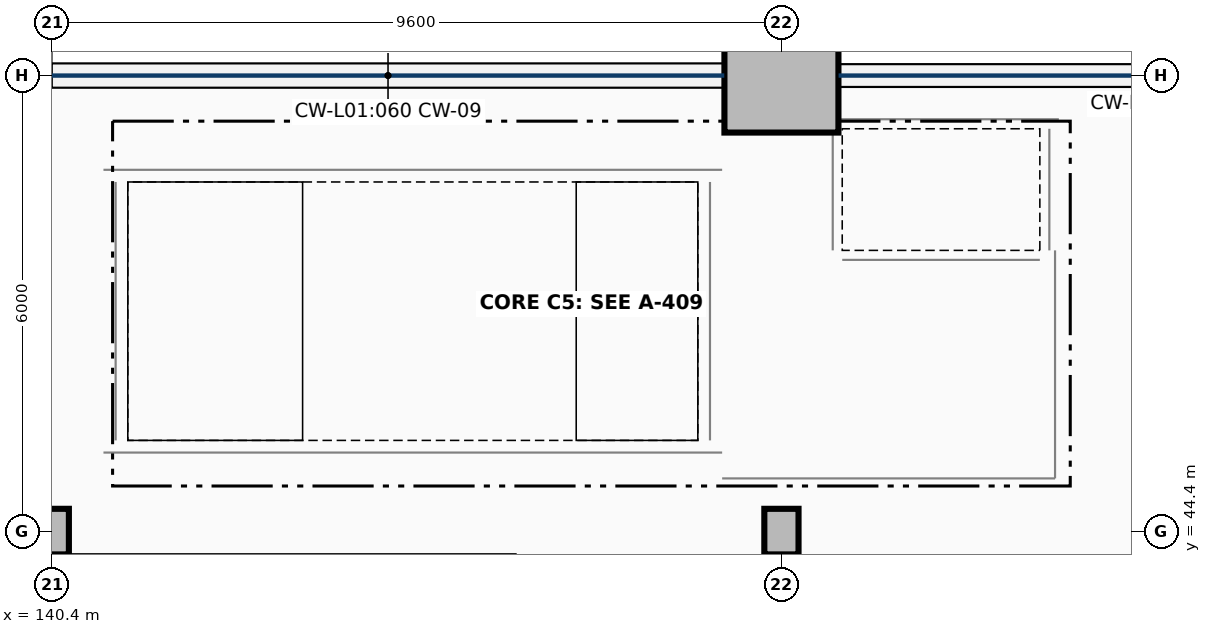
"""IFC4 building model, lengths in metres.
Left out: names, types, materials, properties, quantities, classifications, styles, units other than length and angle.
Written with IfcOpenShell. Run it as: python <this file> out.ifc"""

import sys

from ifc_helpers import new_model, si_unit, direction, frame, frame_2d, origin, origin_2d, place, context, subcontext, project, spatial, rectangle, extrude, element, fill, save


model = new_model("IFC4")
c1 = context("Model", 3, precision=1e-05, world=origin(), true_north=direction((0.0, 1.0)))
c2 = subcontext(c1, "Body", "Model", "MODEL_VIEW")
j1 = project(units=[si_unit("LENGTHUNIT", "METRE"), si_unit("PLANEANGLEUNIT", "RADIAN")], contexts=[c1])
p1 = place(None, origin())
s1 = spatial("IfcSite", under=j1, at=p1, CompositionType="ELEMENT")
p2 = place(p1, origin())
s2 = spatial("IfcBuilding", under=s1, at=p2, CompositionType="ELEMENT")
p3 = place(p2, frame((0.0, 0.0, 5.1)))
s3 = spatial("IfcBuildingStorey", under=s2, at=p3, CompositionType="ELEMENT", Elevation=5.1)
for number, where, z_axis, x_axis in (
    (1, (140.4, 44.4, 0.0), (0.0, 0.0, 1.0), (1.0, 0.0, 0.0)),
    (2, (150.0, 44.4, 0.0), (0.0, 0.0, 1.0), (1.0, 0.0, 0.0)),
):
    element("IfcColumn", number, at=place(p3, frame(where, z_axis=z_axis, x_axis=x_axis)), inside=s3, PredefinedType="COLUMN", context=c2, shape_type="SweptSolid", body=[
        extrude(rectangle(XDim=0.45, YDim=0.6, at=origin_2d()), origin(), (0.0, 0.0, 1.0), 4.42),
    ])
p4 = place(p3, frame((150.0, 50.4, 0.0), z_axis=(0.0, 0.0, 1.0), x_axis=(1.0, 0.0, 0.0)))
e3 = element("IfcColumn", 3, at=p4, inside=s3, PredefinedType="COLUMN", context=c2, shape_type="SweptSolid", body=[
    extrude(rectangle(XDim=1.5, YDim=1.5, at=origin_2d()), origin(), (0.0, 0.0, 1.0), 4.42),
])
p5 = place(p3, frame((131.027, 50.4, 0.0), z_axis=(0.0, 0.0, 1.0), x_axis=(1.0, 0.0, 0.0)))
e4 = element("IfcWall", 4, at=p5, inside=s3, PredefinedType="SOLIDWALL", context=c2, shape_type="SweptSolid", body=[
    extrude(rectangle(XDim=9.373, YDim=0.3, at=frame_2d((4.687, 0.0))), origin(), (0.0, 0.0, 1.0), 0.85),
])
p6 = place(p3, frame((140.4, 50.4, 0.0), z_axis=(0.0, 0.0, 1.0), x_axis=(1.0, 0.0, 0.0)))
e5 = element("IfcWall", 5, at=p6, inside=s3, PredefinedType="SOLIDWALL", context=c2, shape_type="SweptSolid", body=[
    extrude(rectangle(XDim=8.848, YDim=0.32, at=frame_2d((4.424, 0.0))), origin(), (0.0, 0.0, 1.0), 0.85),
])
p7 = place(p3, frame((150.752, 50.4, 0.0), z_axis=(0.0, 0.0, 1.0), x_axis=(1.0, 0.0, 0.0)))
e6 = element("IfcWall", 6, at=p7, inside=s3, PredefinedType="SOLIDWALL", context=c2, shape_type="SweptSolid", body=[
    extrude(rectangle(XDim=8.096, YDim=0.3, at=frame_2d((4.048, 0.0))), origin(), (0.0, 0.0, 1.0), 0.85),
])
p8 = place(p3, frame((141.24, 45.6, 0.0), z_axis=(0.0, 0.0, 1.0), x_axis=(0.0, 1.0, 0.0)))
e7 = element("IfcWall", 7, at=p8, inside=s3, PredefinedType="SHEAR", context=c2, shape_type="SweptSolid", body=[
    extrude(rectangle(XDim=3.4, YDim=0.32, at=frame_2d((1.7, 0.0))), origin(), (0.0, 0.0, 1.0), 4.42),
])
for number, where, z_axis, x_axis in (
    (8, (141.08, 45.44, 0.0), (0.0, 0.0, 1.0), (1.0, 0.0, 0.0)),
    (9, (141.08, 49.16, 0.0), (0.0, 0.0, 1.0), (1.0, 0.0, 0.0)),
):
    element("IfcWall", number, at=place(p3, frame(where, z_axis=z_axis, x_axis=x_axis)), inside=s3, PredefinedType="SHEAR", context=c2, shape_type="SweptSolid", body=[
        extrude(rectangle(XDim=8.14, YDim=0.32, at=frame_2d((4.07, 0.0))), origin(), (0.0, 0.0, 1.0), 4.42),
    ])
p9 = place(p3, frame((149.06, 45.6, 0.0), z_axis=(0.0, 0.0, 1.0), x_axis=(0.0, 1.0, 0.0)))
e10 = element("IfcWall", 10, at=p9, inside=s3, PredefinedType="SHEAR", context=c2, shape_type="SweptSolid", body=[
    extrude(rectangle(XDim=3.4, YDim=0.32, at=frame_2d((1.7, 0.0))), origin(), (0.0, 0.0, 1.0), 4.42),
])
p10 = place(p9, frame((0.65, 0.0, 0.0)))
e11 = element("IfcOpeningElement", 11, at=p10, cuts=e10, PredefinedType="OPENING", context=c2, shape_type="SweptSolid", body=[
    extrude(rectangle(XDim=1.2, YDim=2.2, at=frame_2d((0.6, 1.1))), frame((0.0, 0.17, 0.0), z_axis=(0.0, -1.0, 0.0), x_axis=(1.0, 0.0, 0.0)), (0.0, 0.0, 1.0), 0.34),
])
for number, where, z_axis, x_axis in (
    (12, (150.675, 48.1, 0.0), (0.0, 0.0, 1.0), (0.0, 1.0, 0.0)),
    (13, (153.525, 48.1, 0.0), (0.0, 0.0, 1.0), (0.0, 1.0, 0.0)),
):
    element("IfcWall", number, at=place(p3, frame(where, z_axis=z_axis, x_axis=x_axis)), inside=s3, PredefinedType="SHEAR", context=c2, shape_type="SweptSolid", body=[
        extrude(rectangle(XDim=1.6, YDim=0.25, at=frame_2d((0.8, 0.0))), origin(), (0.0, 0.0, 1.0), 4.42),
    ])
p11 = place(p3, frame((150.55, 49.825, 0.0), z_axis=(0.0, 0.0, 1.0), x_axis=(1.0, 0.0, 0.0)))
e14 = element("IfcWall", 14, at=p11, inside=s3, PredefinedType="SHEAR", context=c2, shape_type="SweptSolid", body=[
    extrude(rectangle(XDim=3.1, YDim=0.25, at=frame_2d((1.55, 0.0))), origin(), (0.0, 0.0, 1.0), 4.42),
])
p12 = place(p3, frame((150.8, 47.975, 0.0), z_axis=(0.0, 0.0, 1.0), x_axis=(1.0, 0.0, 0.0)))
e15 = element("IfcWall", 15, at=p12, inside=s3, PredefinedType="SHEAR", context=c2, shape_type="SweptSolid", body=[
    extrude(rectangle(XDim=2.6, YDim=0.25, at=frame_2d((1.3, 0.0))), origin(), (0.0, 0.0, 1.0), 4.42),
])
p13 = place(p12, frame((0.75, 0.0, 0.0)))
e16 = element("IfcOpeningElement", 16, at=p13, cuts=e15, PredefinedType="OPENING", context=c2, shape_type="SweptSolid", body=[
    extrude(rectangle(XDim=1.1, YDim=2.15, at=frame_2d((0.55, 1.075))), frame((0.0, 0.135, 0.0), z_axis=(0.0, -1.0, 0.0), x_axis=(1.0, 0.0, 0.0)), (0.0, 0.0, 1.0), 0.27),
])
p14 = place(p3, frame((153.6, 45.1, 0.0), z_axis=(0.0, 0.0, 1.0), x_axis=(0.0, 1.0, 0.0)))
e17 = element("IfcWall", 17, at=p14, inside=s3, PredefinedType="PARTITIONING", context=c2, shape_type="SweptSolid", body=[
    extrude(rectangle(XDim=3.0, YDim=0.2, at=frame_2d((1.5, 0.0))), origin(), (0.0, 0.0, 1.0), 3.184),
])
p15 = place(p14, frame((0.775, 0.0, 0.0)))
e18 = element("IfcOpeningElement", 18, at=p15, cuts=e17, PredefinedType="OPENING", context=c2, shape_type="SweptSolid", body=[
    extrude(rectangle(XDim=1.45, YDim=2.2, at=frame_2d((0.725, 1.1))), frame((0.0, 0.11, 0.0), z_axis=(0.0, -1.0, 0.0), x_axis=(1.0, 0.0, 0.0)), (0.0, 0.0, 1.0), 0.22),
])
p16 = place(p3, frame((149.22, 45.1, 0.0), z_axis=(0.0, 0.0, 1.0), x_axis=(1.0, 0.0, 0.0)))
e19 = element("IfcWall", 19, at=p16, inside=s3, PredefinedType="PARTITIONING", context=c2, shape_type="SweptSolid", body=[
    extrude(rectangle(XDim=4.38, YDim=0.2, at=frame_2d((2.19, 0.0))), origin(), (0.0, 0.0, 1.0), 3.184),
])
p17 = place(p3, frame((131.097, 44.0, 0.0), z_axis=(0.0, 0.0, 1.0), x_axis=(1.0, 0.0, 0.0)))
e20 = element("IfcWall", 20, at=p17, inside=s3, PredefinedType="PARTITIONING", context=c2, shape_type="SweptSolid", body=[
    extrude(rectangle(XDim=15.405, YDim=0.205, at=frame_2d((7.703, 0.0))), origin(), (0.0, 0.0, 1.0), 3.184),
])
p18 = place(p10, origin())
e21 = element("IfcDoor", 21, at=p18, inside=s3, OperationType="SINGLE_SWING_RIGHT", PredefinedType="DOOR", context=c2, shape_type="SweptSolid", body=[
    extrude(rectangle(XDim=1.2, YDim=2.2, at=frame_2d((0.6, 1.1))), frame((0.0, 0.025, 0.0), z_axis=(0.0, -1.0, 0.0), x_axis=(1.0, 0.0, 0.0)), (0.0, 0.0, 1.0), 0.05),
])
fill(e11, e21)
p19 = place(p13, origin())
e22 = element("IfcDoor", 22, at=p19, inside=s3, OperationType="DOUBLE_DOOR_SLIDING", PredefinedType="DOOR", context=c2, shape_type="SweptSolid", body=[
    extrude(rectangle(XDim=1.1, YDim=2.15, at=frame_2d((0.55, 1.075))), frame((0.0, 0.025, 0.0), z_axis=(0.0, -1.0, 0.0), x_axis=(1.0, 0.0, 0.0)), (0.0, 0.0, 1.0), 0.05),
])
fill(e16, e22)
p20 = place(p15, frame((1.45, 0.0, 0.0), z_axis=(0.0, 0.0, 1.0), x_axis=(-1.0, 0.0, 0.0)))
e23 = element("IfcDoor", 23, at=p20, inside=s3, OperationType="DOUBLE_DOOR_SINGLE_SWING", PredefinedType="DOOR", context=c2, shape_type="SweptSolid", body=[
    extrude(rectangle(XDim=1.45, YDim=2.2, at=frame_2d((0.725, 1.1))), frame((0.0, 0.025, 0.0), z_axis=(0.0, -1.0, 0.0), x_axis=(1.0, 0.0, 0.0)), (0.0, 0.0, 1.0), 0.05),
])
fill(e18, e23)
save(model, sys.argv[1])
